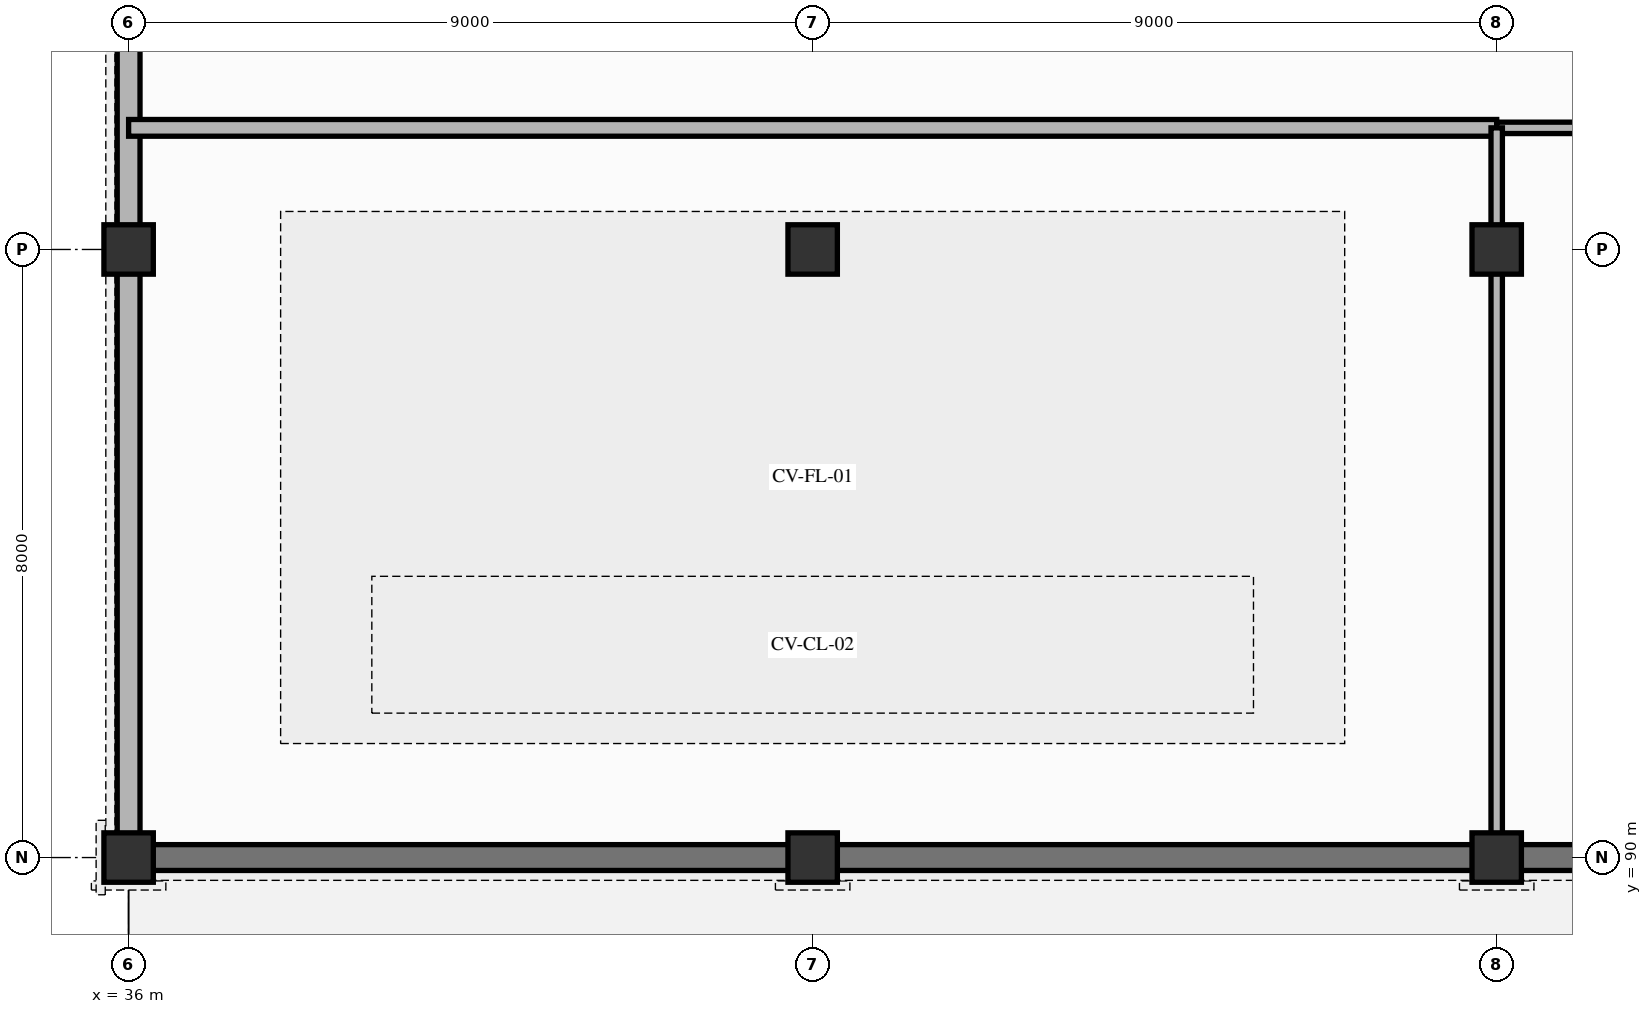
"""IFC4 building model, lengths in metres.
Left out: names, types, materials, properties, quantities, classifications, styles, units other than length and angle.
Written with IfcOpenShell. Run it as: python <this file> out.ifc"""

import sys

from ifc_helpers import new_model, si_unit, direction, frame, frame_2d, origin, origin_2d, place, context, subcontext, project, spatial, rectangle, extrude, element, fill, save


model = new_model("IFC4")
c1 = context("Model", 3, precision=1e-05, world=origin(), true_north=direction((0.0, 1.0)))
c2 = subcontext(c1, "Body", "Model", "MODEL_VIEW")
j1 = project(units=[si_unit("LENGTHUNIT", "METRE"), si_unit("PLANEANGLEUNIT", "RADIAN")], contexts=[c1])
p1 = place(None, origin())
s1 = spatial("IfcSite", under=j1, at=p1, CompositionType="ELEMENT")
p2 = place(p1, origin())
s2 = spatial("IfcBuilding", under=s1, at=p2, CompositionType="ELEMENT")
p3 = place(p2, frame((0.0, 0.0, 16.52)))
s3 = spatial("IfcBuildingStorey", under=s2, at=p3, CompositionType="ELEMENT", Elevation=16.52)
for number, where, z_axis, x_axis in (
    (1, (36.0, 90.0, 0.0), (0.0, 0.0, 1.0), (1.0, 0.0, 0.0)),
    (2, (36.0, 98.0, 0.0), (0.0, 0.0, 1.0), (1.0, 0.0, 0.0)),
    (3, (45.0, 90.0, 0.0), (0.0, 0.0, 1.0), (1.0, 0.0, 0.0)),
    (4, (45.0, 98.0, 0.0), (0.0, 0.0, 1.0), (1.0, 0.0, 0.0)),
    (5, (54.0, 90.0, 0.0), (0.0, 0.0, 1.0), (1.0, 0.0, 0.0)),
    (6, (54.0, 98.0, 0.0), (0.0, 0.0, 1.0), (1.0, 0.0, 0.0)),
):
    element("IfcColumn", number, at=place(p3, frame(where, z_axis=z_axis, x_axis=x_axis)), inside=s3, PredefinedType="COLUMN", context=c2, shape_type="SweptSolid", body=[
        extrude(rectangle(XDim=0.65, YDim=0.65, at=origin_2d()), origin(), (0.0, 0.0, 1.0), 3.74),
    ])
p4 = place(p3, frame((36.0, 90.0, 0.0), z_axis=(0.0, 0.0, 1.0), x_axis=(1.0, 0.0, 0.0)))
e7 = element("IfcWall", 7, at=p4, inside=s3, PredefinedType="SOLIDWALL", context=c2, shape_type="SweptSolid", body=[
    extrude(rectangle(XDim=9.0, YDim=0.34, at=frame_2d((4.5, 0.0))), origin(), (0.0, 0.0, 1.0), 3.46),
])
p5 = place(p4, frame((1.8, 0.0, 0.645)))
e8 = element("IfcOpeningElement", 8, at=p5, cuts=e7, PredefinedType="OPENING", context=c2, shape_type="SweptSolid", body=[
    extrude(rectangle(XDim=1.5, YDim=2.1, at=frame_2d((0.75, 1.05))), frame((0.0, 0.18, 0.0), z_axis=(0.0, -1.0, 0.0), x_axis=(1.0, 0.0, 0.0)), (0.0, 0.0, 1.0), 0.36),
])
p6 = place(p4, frame((5.4, 0.0, 0.645)))
e9 = element("IfcOpeningElement", 9, at=p6, cuts=e7, PredefinedType="OPENING", context=c2, shape_type="SweptSolid", body=[
    extrude(rectangle(XDim=1.2, YDim=2.1, at=frame_2d((0.6, 1.05))), frame((0.0, 0.18, 0.0), z_axis=(0.0, -1.0, 0.0), x_axis=(1.0, 0.0, 0.0)), (0.0, 0.0, 1.0), 0.36),
])
p7 = place(p3, frame((45.0, 90.0, 0.0), z_axis=(0.0, 0.0, 1.0), x_axis=(1.0, 0.0, 0.0)))
e10 = element("IfcWall", 10, at=p7, inside=s3, PredefinedType="SOLIDWALL", context=c2, shape_type="SweptSolid", body=[
    extrude(rectangle(XDim=9.0, YDim=0.34, at=frame_2d((4.5, 0.0))), origin(), (0.0, 0.0, 1.0), 3.46),
])
p8 = place(p7, frame((1.8, 0.0, 0.61)))
e11 = element("IfcOpeningElement", 11, at=p8, cuts=e10, PredefinedType="OPENING", context=c2, shape_type="SweptSolid", body=[
    extrude(rectangle(XDim=1.5, YDim=2.1, at=frame_2d((0.75, 1.05))), frame((0.0, 0.18, 0.0), z_axis=(0.0, -1.0, 0.0), x_axis=(1.0, 0.0, 0.0)), (0.0, 0.0, 1.0), 0.36),
])
p9 = place(p7, frame((5.4, 0.0, 0.61)))
e12 = element("IfcOpeningElement", 12, at=p9, cuts=e10, PredefinedType="OPENING", context=c2, shape_type="SweptSolid", body=[
    extrude(rectangle(XDim=1.2, YDim=2.1, at=frame_2d((0.6, 1.05))), frame((0.0, 0.18, 0.0), z_axis=(0.0, -1.0, 0.0), x_axis=(1.0, 0.0, 0.0)), (0.0, 0.0, 1.0), 0.36),
])
p10 = place(p3, frame((54.0, 90.0, 0.0), z_axis=(0.0, 0.0, 1.0), x_axis=(1.0, 0.0, 0.0)))
e13 = element("IfcWall", 13, at=p10, inside=s3, PredefinedType="SOLIDWALL", context=c2, shape_type="SweptSolid", body=[
    extrude(rectangle(XDim=9.0, YDim=0.34, at=frame_2d((4.5, 0.0))), origin(), (0.0, 0.0, 1.0), 3.46),
])
p11 = place(p10, frame((3.6, 0.0, 0.0)))
e14 = element("IfcOpeningElement", 14, at=p11, cuts=e13, PredefinedType="OPENING", context=c2, shape_type="SweptSolid", body=[
    extrude(rectangle(XDim=1.6, YDim=2.25, at=frame_2d((0.8, 1.125))), frame((0.0, 0.18, 0.0), z_axis=(0.0, -1.0, 0.0), x_axis=(1.0, 0.0, 0.0)), (0.0, 0.0, 1.0), 0.36),
])
p12 = place(p3, frame((36.0, 90.0, 0.0), z_axis=(0.0, 0.0, 1.0), x_axis=(0.0, 1.0, 0.0)))
e15 = element("IfcWall", 15, at=p12, inside=s3, PredefinedType="SOLIDWALL", context=c2, shape_type="SweptSolid", body=[
    extrude(rectangle(XDim=24.0, YDim=0.3, at=frame_2d((12.0, 0.0))), origin(), (0.0, 0.0, 1.0), 2.785),
])
p13 = place(p12, frame((3.0, 0.0, 0.815)))
e16 = element("IfcOpeningElement", 16, at=p13, cuts=e15, PredefinedType="OPENING", context=c2, shape_type="SweptSolid", body=[
    extrude(rectangle(XDim=1.35, YDim=1.85, at=frame_2d((0.675, 0.925))), frame((0.0, 0.16, 0.0), z_axis=(0.0, -1.0, 0.0), x_axis=(1.0, 0.0, 0.0)), (0.0, 0.0, 1.0), 0.32),
])
p14 = place(p12, frame((11.7, 0.0, 0.915)))
e17 = element("IfcOpeningElement", 17, at=p14, cuts=e15, PredefinedType="OPENING", context=c2, shape_type="SweptSolid", body=[
    extrude(rectangle(XDim=1.05, YDim=1.75, at=frame_2d((0.525, 0.875))), frame((0.0, 0.16, 0.0), z_axis=(0.0, -1.0, 0.0), x_axis=(1.0, 0.0, 0.0)), (0.0, 0.0, 1.0), 0.32),
])
p15 = place(p12, frame((16.5, 0.0, 0.565)))
e18 = element("IfcOpeningElement", 18, at=p15, cuts=e15, PredefinedType="OPENING", context=c2, shape_type="SweptSolid", body=[
    extrude(rectangle(XDim=1.5, YDim=2.1, at=frame_2d((0.75, 1.05))), frame((0.0, 0.16, 0.0), z_axis=(0.0, -1.0, 0.0), x_axis=(1.0, 0.0, 0.0)), (0.0, 0.0, 1.0), 0.32),
])
p16 = place(p3, frame((36.0, 99.6, 0.0), z_axis=(0.0, 0.0, 1.0), x_axis=(1.0, 0.0, 0.0)))
e19 = element("IfcWall", 19, at=p16, inside=s3, PredefinedType="PARTITIONING", context=c2, shape_type="SweptSolid", body=[
    extrude(rectangle(XDim=18.0, YDim=0.22, at=frame_2d((9.0, 0.0))), origin(), (0.0, 0.0, 1.0), 2.65),
])
p17 = place(p16, frame((8.4, 0.0, 0.0)))
e20 = element("IfcOpeningElement", 20, at=p17, cuts=e19, PredefinedType="OPENING", context=c2, shape_type="SweptSolid", body=[
    extrude(rectangle(XDim=1.62, YDim=2.22, at=frame_2d((0.81, 1.11))), frame((0.0, 0.12, 0.0), z_axis=(0.0, -1.0, 0.0), x_axis=(1.0, 0.0, 0.0)), (0.0, 0.0, 1.0), 0.24),
])
p18 = place(p3, frame((54.0, 99.6, 0.0), z_axis=(0.0, 0.0, 1.0), x_axis=(1.0, 0.0, 0.0)))
e21 = element("IfcWall", 21, at=p18, inside=s3, PredefinedType="PARTITIONING", context=c2, shape_type="SweptSolid", body=[
    extrude(rectangle(XDim=15.0, YDim=0.15, at=frame_2d((7.5, 0.0))), origin(), (0.0, 0.0, 1.0), 3.46),
])
p19 = place(p18, frame((6.9, 0.0, 0.0)))
e22 = element("IfcOpeningElement", 22, at=p19, cuts=e21, PredefinedType="OPENING", context=c2, shape_type="SweptSolid", body=[
    extrude(rectangle(XDim=1.6, YDim=2.2, at=frame_2d((0.8, 1.1))), frame((0.0, 0.085, 0.0), z_axis=(0.0, -1.0, 0.0), x_axis=(1.0, 0.0, 0.0)), (0.0, 0.0, 1.0), 0.17),
])
p20 = place(p3, frame((54.0, 90.0, 0.0), z_axis=(0.0, 0.0, 1.0), x_axis=(0.0, 1.0, 0.0)))
e23 = element("IfcWall", 23, at=p20, inside=s3, PredefinedType="PARTITIONING", context=c2, shape_type="SweptSolid", body=[
    extrude(rectangle(XDim=9.6, YDim=0.15, at=frame_2d((4.8, 0.0))), origin(), (0.0, 0.0, 1.0), 2.65),
])
p21 = place(p5, origin())
e24 = element("IfcWindow", 24, at=p21, inside=s3, PartitioningType="SINGLE_PANEL", PredefinedType="WINDOW", context=c2, shape_type="SweptSolid", body=[
    extrude(rectangle(XDim=1.5, YDim=2.1, at=frame_2d((0.75, 1.05))), frame((0.0, 0.03, 0.0), z_axis=(0.0, -1.0, 0.0), x_axis=(1.0, 0.0, 0.0)), (0.0, 0.0, 1.0), 0.06),
])
fill(e8, e24)
p22 = place(p6, origin())
e25 = element("IfcWindow", 25, at=p22, inside=s3, PartitioningType="SINGLE_PANEL", PredefinedType="WINDOW", context=c2, shape_type="SweptSolid", body=[
    extrude(rectangle(XDim=1.2, YDim=2.1, at=frame_2d((0.6, 1.05))), frame((0.0, 0.03, 0.0), z_axis=(0.0, -1.0, 0.0), x_axis=(1.0, 0.0, 0.0)), (0.0, 0.0, 1.0), 0.06),
])
fill(e9, e25)
p23 = place(p8, origin())
e26 = element("IfcWindow", 26, at=p23, inside=s3, PartitioningType="SINGLE_PANEL", PredefinedType="WINDOW", context=c2, shape_type="SweptSolid", body=[
    extrude(rectangle(XDim=1.5, YDim=2.1, at=frame_2d((0.75, 1.05))), frame((0.0, 0.03, 0.0), z_axis=(0.0, -1.0, 0.0), x_axis=(1.0, 0.0, 0.0)), (0.0, 0.0, 1.0), 0.06),
])
fill(e11, e26)
p24 = place(p9, origin())
e27 = element("IfcWindow", 27, at=p24, inside=s3, PartitioningType="SINGLE_PANEL", PredefinedType="WINDOW", context=c2, shape_type="SweptSolid", body=[
    extrude(rectangle(XDim=1.2, YDim=2.1, at=frame_2d((0.6, 1.05))), frame((0.0, 0.03, 0.0), z_axis=(0.0, -1.0, 0.0), x_axis=(1.0, 0.0, 0.0)), (0.0, 0.0, 1.0), 0.06),
])
fill(e12, e27)
p25 = place(p13, origin())
e28 = element("IfcWindow", 28, at=p25, inside=s3, PartitioningType="SINGLE_PANEL", PredefinedType="WINDOW", context=c2, shape_type="SweptSolid", body=[
    extrude(rectangle(XDim=1.35, YDim=1.85, at=frame_2d((0.675, 0.925))), frame((0.0, 0.03, 0.0), z_axis=(0.0, -1.0, 0.0), x_axis=(1.0, 0.0, 0.0)), (0.0, 0.0, 1.0), 0.06),
])
fill(e16, e28)
p26 = place(p17, origin())
e29 = element("IfcDoor", 29, at=p26, inside=s3, OperationType="DOUBLE_DOOR_SINGLE_SWING", PredefinedType="DOOR", context=c2, shape_type="SweptSolid", body=[
    extrude(rectangle(XDim=1.62, YDim=2.22, at=frame_2d((0.81, 1.11))), frame((0.0, 0.025, 0.0), z_axis=(0.0, -1.0, 0.0), x_axis=(1.0, 0.0, 0.0)), (0.0, 0.0, 1.0), 0.05),
])
fill(e20, e29)
save(model, sys.argv[1])
